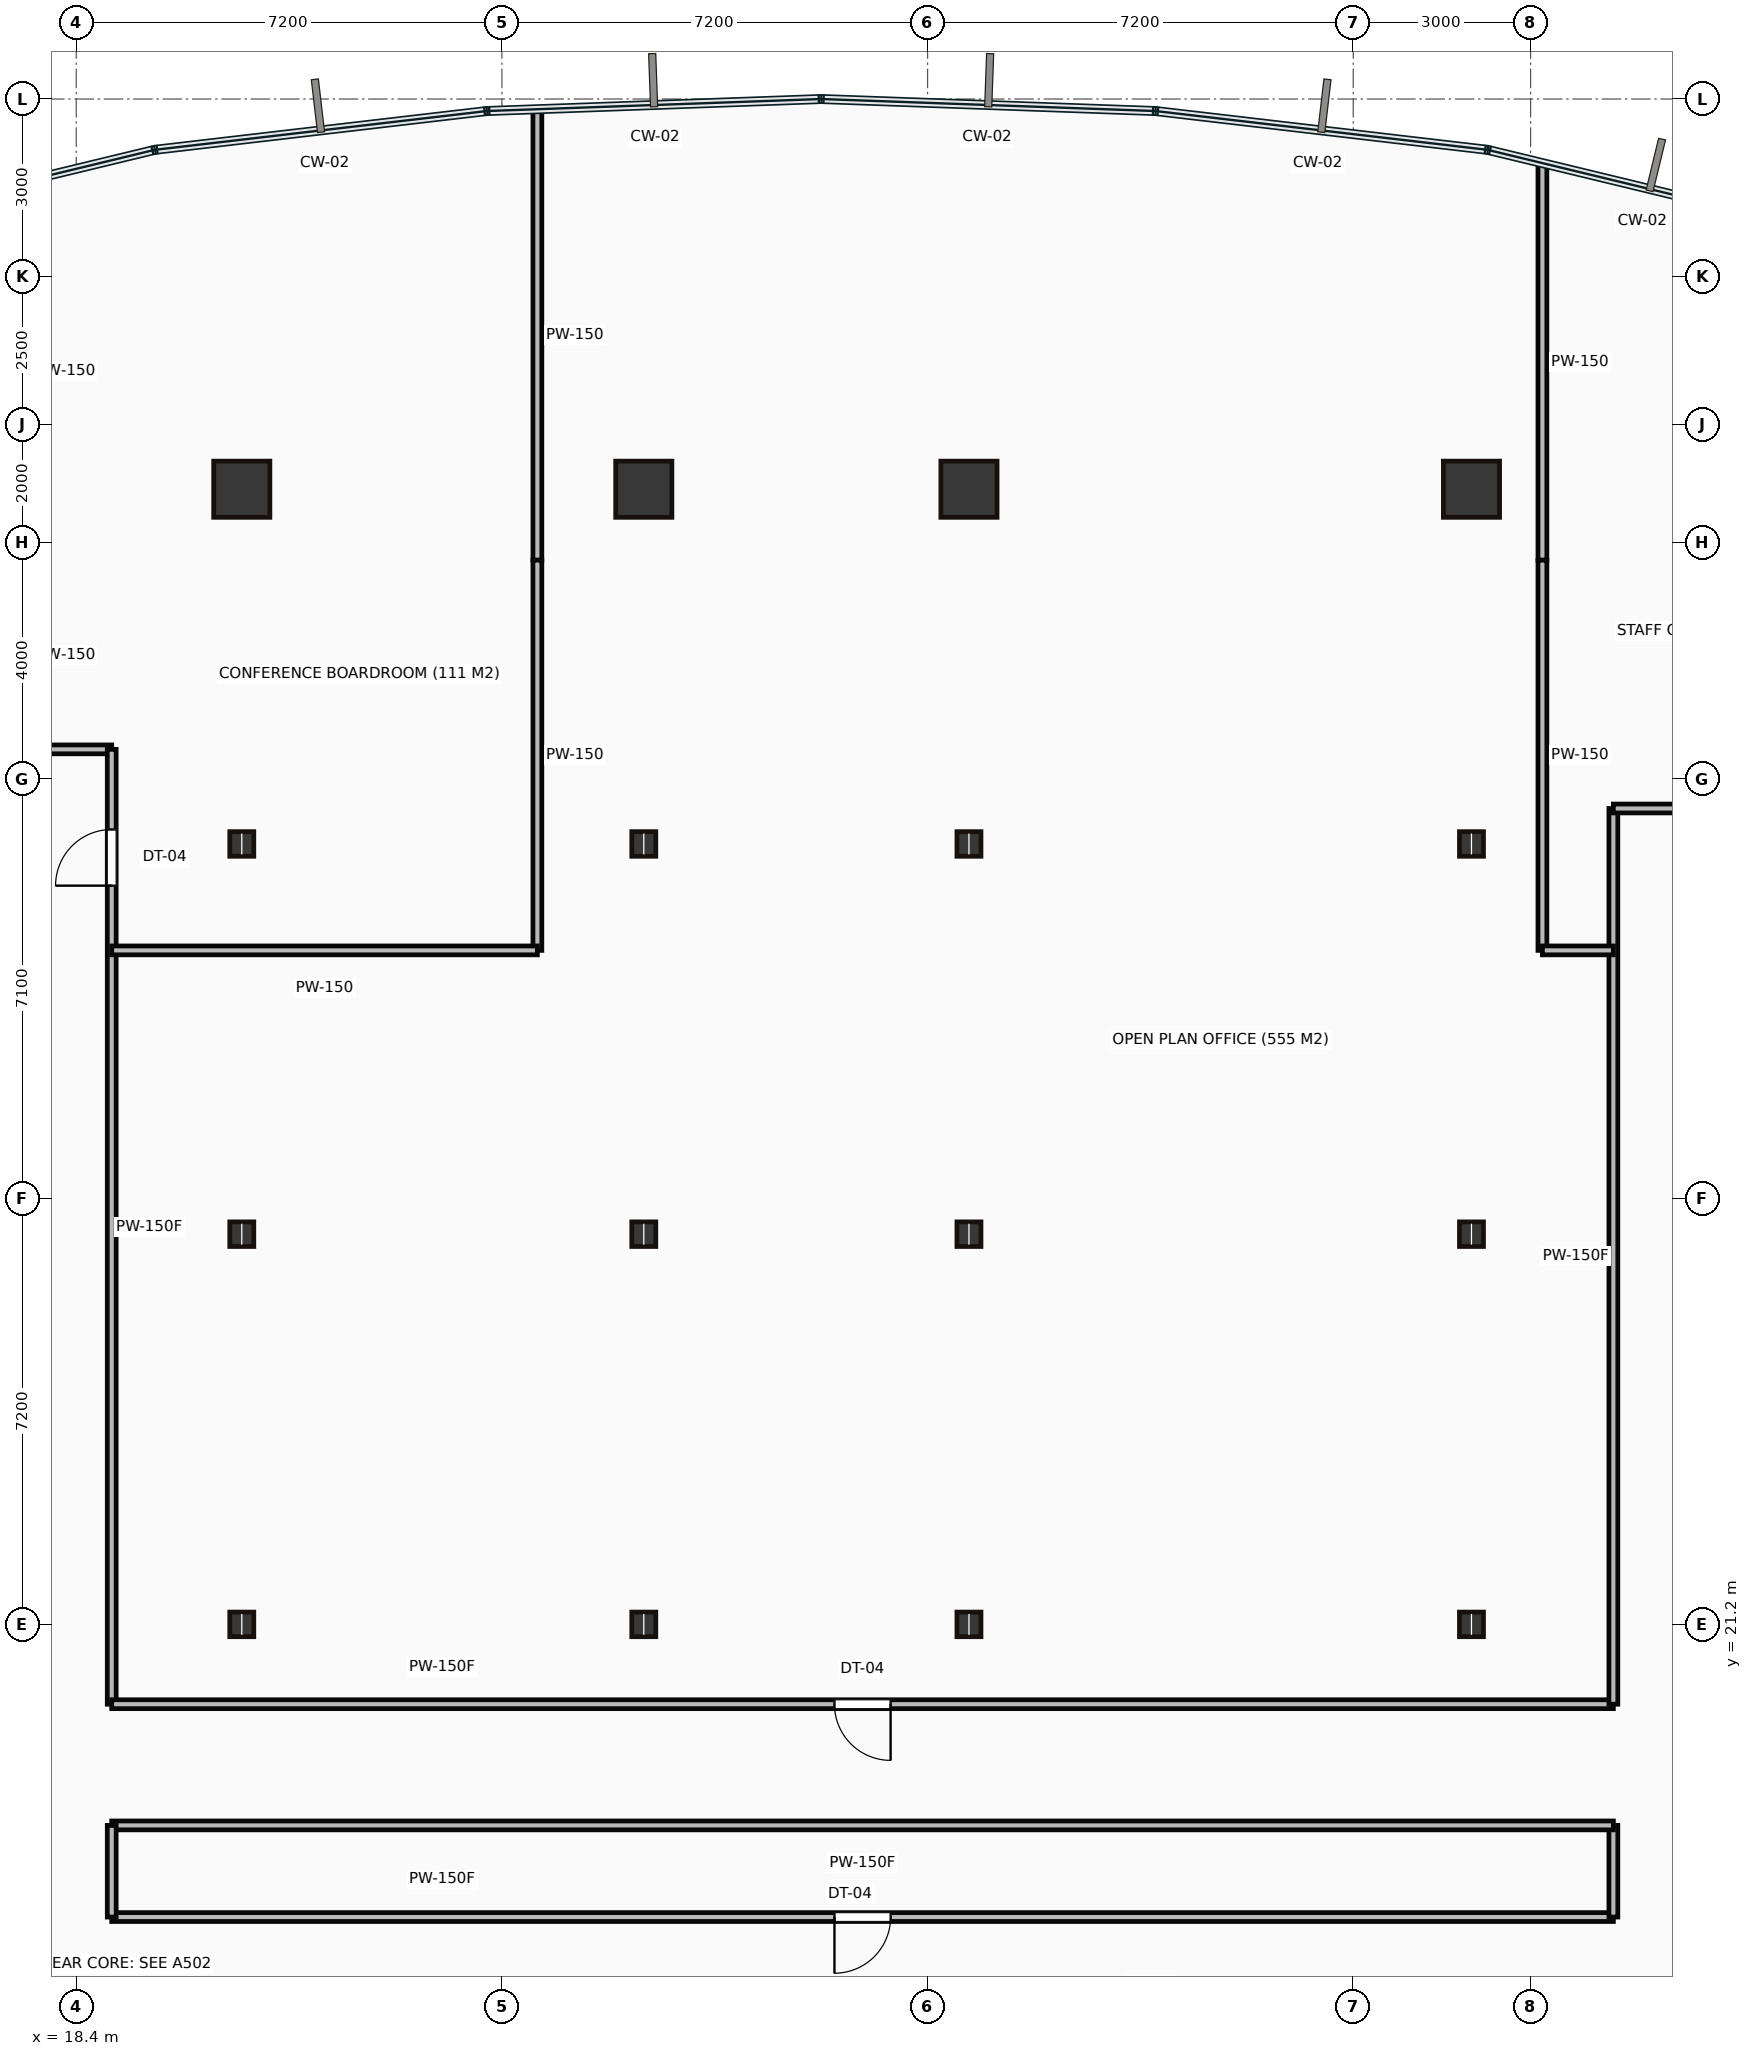
"""IFC4 building model, lengths in metres.
Left out: names, types, materials, properties, quantities, classifications, styles, units other than length and angle.
Written with IfcOpenShell. Run it as: python <this file> out.ifc"""

import sys

from ifc_helpers import new_model, si_unit, direction, frame, frame_2d, origin, origin_2d, place, context, subcontext, project, spatial, rectangle, hollow_rectangle, i_section, extrude, source, transform, mapped, element, fill, save


model = new_model("IFC4")
c1 = context("Model", 3, precision=1e-05, world=origin(), true_north=direction((0.0, 1.0)))
c2 = subcontext(c1, "Body", "Model", "MODEL_VIEW")
j1 = project(units=[si_unit("LENGTHUNIT", "METRE"), si_unit("PLANEANGLEUNIT", "RADIAN")], contexts=[c1])
p1 = place(None, origin())
s1 = spatial("IfcSite", under=j1, at=p1, CompositionType="ELEMENT")
p2 = place(p1, origin())
s2 = spatial("IfcBuilding", under=s1, at=p2, CompositionType="ELEMENT")
p3 = place(p2, frame((0.0, 0.0, 39.8)))
s3 = spatial("IfcBuildingStorey", under=s2, at=p3, CompositionType="ELEMENT", Elevation=39.8)
m1 = source(origin(), c2, "Body", "SweptSolid", [
    extrude(i_section(OverallWidth=0.406, OverallDepth=0.416, WebThickness=0.03, FlangeThickness=0.048, at=origin_2d()), origin(), (0.0, 0.0, 1.0), 3.65),
])
for number, where, z_axis, x_axis in (
    (1, (21.2, 21.2, 0.0), (0.0, 0.0, 1.0), (1.0, 0.0, 0.0)),
    (2, (21.2, 27.8, 0.0), (0.0, 0.0, 1.0), (1.0, 0.0, 0.0)),
    (3, (21.2, 34.4, 0.0), (0.0, 0.0, 1.0), (1.0, 0.0, 0.0)),
):
    element("IfcColumn", number, at=place(p3, frame(where, z_axis=z_axis, x_axis=x_axis)), inside=s3, PredefinedType="COLUMN", context=c2, shape_type="MappedRepresentation", body=[
        mapped(m1, transform((0.0, 0.0, 0.0))),
    ])
m2 = source(origin(), c2, "Body", "SweptSolid", [
    extrude(hollow_rectangle(XDim=0.95, YDim=0.95, WallThickness=0.045, at=origin_2d()), origin(), (0.0, 0.0, 1.0), 3.65),
])
p4 = place(p3, frame((21.2, 40.4, 0.0), z_axis=(0.0, 0.0, 1.0), x_axis=(1.0, 0.0, 0.0)))
e4 = element("IfcColumn", 4, at=p4, inside=s3, PredefinedType="COLUMN", context=c2, shape_type="MappedRepresentation", body=[
    mapped(m2, transform((0.0, 0.0, 0.0))),
])
for number, where, z_axis, x_axis in (
    (5, (28.0, 21.2, 0.0), (0.0, 0.0, 1.0), (1.0, 0.0, 0.0)),
    (6, (28.0, 27.8, 0.0), (0.0, 0.0, 1.0), (1.0, 0.0, 0.0)),
    (7, (28.0, 34.4, 0.0), (0.0, 0.0, 1.0), (1.0, 0.0, 0.0)),
):
    element("IfcColumn", number, at=place(p3, frame(where, z_axis=z_axis, x_axis=x_axis)), inside=s3, PredefinedType="COLUMN", context=c2, shape_type="MappedRepresentation", body=[
        mapped(m1, transform((0.0, 0.0, 0.0))),
    ])
p5 = place(p3, frame((28.0, 40.4, 0.0), z_axis=(0.0, 0.0, 1.0), x_axis=(1.0, 0.0, 0.0)))
e8 = element("IfcColumn", 8, at=p5, inside=s3, PredefinedType="COLUMN", context=c2, shape_type="MappedRepresentation", body=[
    mapped(m2, transform((0.0, 0.0, 0.0))),
])
for number, where, z_axis, x_axis in (
    (9, (33.5, 21.2, 0.0), (0.0, 0.0, 1.0), (1.0, 0.0, 0.0)),
    (10, (33.5, 27.8, 0.0), (0.0, 0.0, 1.0), (1.0, 0.0, 0.0)),
    (11, (33.5, 34.4, 0.0), (0.0, 0.0, 1.0), (1.0, 0.0, 0.0)),
):
    element("IfcColumn", number, at=place(p3, frame(where, z_axis=z_axis, x_axis=x_axis)), inside=s3, PredefinedType="COLUMN", context=c2, shape_type="MappedRepresentation", body=[
        mapped(m1, transform((0.0, 0.0, 0.0))),
    ])
p6 = place(p3, frame((33.5, 40.4, 0.0), z_axis=(0.0, 0.0, 1.0), x_axis=(1.0, 0.0, 0.0)))
e12 = element("IfcColumn", 12, at=p6, inside=s3, PredefinedType="COLUMN", context=c2, shape_type="MappedRepresentation", body=[
    mapped(m2, transform((0.0, 0.0, 0.0))),
])
for number, where, z_axis, x_axis in (
    (13, (42.0, 21.2, 0.0), (0.0, 0.0, 1.0), (1.0, 0.0, 0.0)),
    (14, (42.0, 27.8, 0.0), (0.0, 0.0, 1.0), (1.0, 0.0, 0.0)),
    (15, (42.0, 34.4, 0.0), (0.0, 0.0, 1.0), (1.0, 0.0, 0.0)),
):
    element("IfcColumn", number, at=place(p3, frame(where, z_axis=z_axis, x_axis=x_axis)), inside=s3, PredefinedType="COLUMN", context=c2, shape_type="MappedRepresentation", body=[
        mapped(m1, transform((0.0, 0.0, 0.0))),
    ])
p7 = place(p3, frame((42.0, 40.4, 0.0), z_axis=(0.0, 0.0, 1.0), x_axis=(1.0, 0.0, 0.0)))
e16 = element("IfcColumn", 16, at=p7, inside=s3, PredefinedType="COLUMN", context=c2, shape_type="MappedRepresentation", body=[
    mapped(m2, transform((0.0, 0.0, 0.0))),
])
m3 = source(origin(), c2, "Body", "SweptSolid", [
    extrude(rectangle(XDim=2.2, YDim=0.15, at=frame_2d((1.1, 0.0))), origin(), (0.0, 0.0, 1.0), 3.4),
])
p8 = place(p3, frame((16.8, 36.0, 0.0), z_axis=(0.0, 0.0, 1.0), x_axis=(1.0, 0.0, 0.0)))
e17 = element("IfcWall", 17, at=p8, inside=s3, PredefinedType="PARTITIONING", context=c2, shape_type="MappedRepresentation", body=[
    mapped(m3, transform((0.0, 0.0, 0.0))),
])
m4 = source(origin(), c2, "Body", "SweptSolid", [
    extrude(rectangle(XDim=16.15, YDim=0.15, at=frame_2d((8.075, 0.0))), origin(), (0.0, 0.0, 1.0), 3.4),
])
p9 = place(p3, frame((19.0, 36.0, 0.0), z_axis=(0.0, 0.0, 1.0), x_axis=(0.0, -1.0, 0.0)))
e18 = element("IfcWall", 18, at=p9, inside=s3, PredefinedType="PARTITIONING", context=c2, shape_type="MappedRepresentation", body=[
    mapped(m4, transform((0.0, 0.0, 0.0))),
])
p10 = place(p9, frame((1.355, 0.0, 0.0)))
e19 = element("IfcOpeningElement", 19, at=p10, cuts=e18, PredefinedType="OPENING", context=c2, shape_type="SweptSolid", body=[
    extrude(rectangle(XDim=0.95, YDim=2.15, at=frame_2d((0.475, 1.075))), frame((0.0, 0.085, 0.0), z_axis=(0.0, -1.0, 0.0), x_axis=(1.0, 0.0, 0.0)), (0.0, 0.0, 1.0), 0.17),
])
m5 = source(origin(), c2, "Body", "SweptSolid", [
    extrude(rectangle(XDim=25.4, YDim=0.15, at=frame_2d((12.7, 0.0))), origin(), (0.0, 0.0, 1.0), 3.4),
])
p11 = place(p3, frame((19.0, 19.85, 0.0), z_axis=(0.0, 0.0, 1.0), x_axis=(1.0, 0.0, 0.0)))
e20 = element("IfcWall", 20, at=p11, inside=s3, PredefinedType="PARTITIONING", context=c2, shape_type="MappedRepresentation", body=[
    mapped(m5, transform((0.0, 0.0, 0.0))),
])
p12 = place(p11, frame((12.225, 0.0, 0.0)))
e21 = element("IfcOpeningElement", 21, at=p12, cuts=e20, PredefinedType="OPENING", context=c2, shape_type="SweptSolid", body=[
    extrude(rectangle(XDim=0.95, YDim=2.15, at=frame_2d((0.475, 1.075))), frame((0.0, 0.085, 0.0), z_axis=(0.0, -1.0, 0.0), x_axis=(1.0, 0.0, 0.0)), (0.0, 0.0, 1.0), 0.17),
])
m6 = source(origin(), c2, "Body", "SweptSolid", [
    extrude(rectangle(XDim=15.15, YDim=0.15, at=frame_2d((7.575, 0.0))), origin(), (0.0, 0.0, 1.0), 3.4),
])
p13 = place(p3, frame((44.4, 19.85, 0.0), z_axis=(0.0, 0.0, 1.0), x_axis=(0.0, 1.0, 0.0)))
e22 = element("IfcWall", 22, at=p13, inside=s3, PredefinedType="PARTITIONING", context=c2, shape_type="MappedRepresentation", body=[
    mapped(m6, transform((0.0, 0.0, 0.0))),
])
m7 = source(origin(), c2, "Body", "SweptSolid", [
    extrude(rectangle(XDim=2.2, YDim=0.15, at=frame_2d((1.1, 0.0))), origin(), (0.0, 0.0, 1.0), 3.4),
])
p14 = place(p3, frame((44.4, 35.0, 0.0), z_axis=(0.0, 0.0, 1.0), x_axis=(1.0, 0.0, 0.0)))
e23 = element("IfcWall", 23, at=p14, inside=s3, PredefinedType="PARTITIONING", context=c2, shape_type="MappedRepresentation", body=[
    mapped(m7, transform((0.0, 0.0, 0.0))),
])
p15 = place(p3, frame((19.0, 16.25, 0.0), z_axis=(0.0, 0.0, 1.0), x_axis=(1.0, 0.0, 0.0)))
e24 = element("IfcWall", 24, at=p15, inside=s3, PredefinedType="PARTITIONING", context=c2, shape_type="MappedRepresentation", body=[
    mapped(m5, transform((0.0, 0.0, 0.0))),
])
p16 = place(p15, frame((12.225, 0.0, 0.0)))
e25 = element("IfcOpeningElement", 25, at=p16, cuts=e24, PredefinedType="OPENING", context=c2, shape_type="SweptSolid", body=[
    extrude(rectangle(XDim=0.95, YDim=2.15, at=frame_2d((0.475, 1.075))), frame((0.0, 0.085, 0.0), z_axis=(0.0, -1.0, 0.0), x_axis=(1.0, 0.0, 0.0)), (0.0, 0.0, 1.0), 0.17),
])
m8 = source(origin(), c2, "Body", "SweptSolid", [
    extrude(rectangle(XDim=1.55, YDim=0.15, at=frame_2d((0.775, 0.0))), origin(), (0.0, 0.0, 1.0), 3.4),
])
p17 = place(p3, frame((44.4, 16.25, 0.0), z_axis=(0.0, 0.0, 1.0), x_axis=(0.0, 1.0, 0.0)))
e26 = element("IfcWall", 26, at=p17, inside=s3, PredefinedType="PARTITIONING", context=c2, shape_type="MappedRepresentation", body=[
    mapped(m8, transform((0.0, 0.0, 0.0))),
])
p18 = place(p3, frame((44.4, 17.8, 0.0), z_axis=(0.0, 0.0, 1.0), x_axis=(-1.0, 0.0, 0.0)))
e27 = element("IfcWall", 27, at=p18, inside=s3, PredefinedType="PARTITIONING", context=c2, shape_type="MappedRepresentation", body=[
    mapped(m5, transform((0.0, 0.0, 0.0))),
])
p19 = place(p3, frame((19.0, 17.8, 0.0), z_axis=(0.0, 0.0, 1.0), x_axis=(0.0, -1.0, 0.0)))
e28 = element("IfcWall", 28, at=p19, inside=s3, PredefinedType="PARTITIONING", context=c2, shape_type="MappedRepresentation", body=[
    mapped(m8, transform((0.0, 0.0, 0.0))),
])
m9 = source(origin(), c2, "Body", "SweptSolid", [
    extrude(rectangle(XDim=7.608, YDim=0.15, at=frame_2d((3.804, 0.0))), origin(), (0.0, 0.0, 1.0), 3.4),
])
p20 = place(p3, frame((26.2, 46.808, 0.0), z_axis=(0.0, 0.0, 1.0), x_axis=(0.0, -1.0, 0.0)))
e29 = element("IfcWall", 29, at=p20, inside=s3, PredefinedType="PARTITIONING", context=c2, shape_type="MappedRepresentation", body=[
    mapped(m9, transform((0.0, 0.0, 0.0))),
])
m10 = source(origin(), c2, "Body", "SweptSolid", [
    extrude(rectangle(XDim=6.6, YDim=0.15, at=frame_2d((3.3, 0.0))), origin(), (0.0, 0.0, 1.0), 3.4),
])
p21 = place(p3, frame((26.2, 39.2, 0.0), z_axis=(0.0, 0.0, 1.0), x_axis=(0.0, -1.0, 0.0)))
e30 = element("IfcWall", 30, at=p21, inside=s3, PredefinedType="PARTITIONING", context=c2, shape_type="MappedRepresentation", body=[
    mapped(m10, transform((0.0, 0.0, 0.0))),
])
m11 = source(origin(), c2, "Body", "SweptSolid", [
    extrude(rectangle(XDim=7.2, YDim=0.15, at=frame_2d((3.6, 0.0))), origin(), (0.0, 0.0, 1.0), 3.4),
])
p22 = place(p3, frame((26.2, 32.6, 0.0), z_axis=(0.0, 0.0, 1.0), x_axis=(-1.0, 0.0, 0.0)))
e31 = element("IfcWall", 31, at=p22, inside=s3, PredefinedType="PARTITIONING", context=c2, shape_type="MappedRepresentation", body=[
    mapped(m11, transform((0.0, 0.0, 0.0))),
])
m12 = source(origin(), c2, "Body", "SweptSolid", [
    extrude(rectangle(XDim=6.696, YDim=0.15, at=frame_2d((3.348, 0.0))), origin(), (0.0, 0.0, 1.0), 3.4),
])
p23 = place(p3, frame((43.2, 45.896, 0.0), z_axis=(0.0, 0.0, 1.0), x_axis=(0.0, -1.0, 0.0)))
e32 = element("IfcWall", 32, at=p23, inside=s3, PredefinedType="PARTITIONING", context=c2, shape_type="MappedRepresentation", body=[
    mapped(m12, transform((0.0, 0.0, 0.0))),
])
p24 = place(p3, frame((43.2, 39.2, 0.0), z_axis=(0.0, 0.0, 1.0), x_axis=(0.0, -1.0, 0.0)))
e33 = element("IfcWall", 33, at=p24, inside=s3, PredefinedType="PARTITIONING", context=c2, shape_type="MappedRepresentation", body=[
    mapped(m10, transform((0.0, 0.0, 0.0))),
])
m13 = source(origin(), c2, "Body", "SweptSolid", [
    extrude(rectangle(XDim=1.2, YDim=0.15, at=frame_2d((0.6, 0.0))), origin(), (0.0, 0.0, 1.0), 3.4),
])
p25 = place(p3, frame((43.2, 32.6, 0.0), z_axis=(0.0, 0.0, 1.0), x_axis=(1.0, 0.0, 0.0)))
e34 = element("IfcWall", 34, at=p25, inside=s3, PredefinedType="PARTITIONING", context=c2, shape_type="MappedRepresentation", body=[
    mapped(m13, transform((0.0, 0.0, 0.0))),
])
m14 = source(origin(), c2, "Body", "SweptSolid", [
    extrude(rectangle(XDim=0.95, YDim=2.15, at=frame_2d((0.475, 1.075))), frame((0.0, 0.025, 0.0), z_axis=(0.0, -1.0, 0.0), x_axis=(1.0, 0.0, 0.0)), (0.0, 0.0, 1.0), 0.05),
])
p26 = place(p10, origin())
e35 = element("IfcDoor", 35, at=p26, inside=s3, OperationType="SINGLE_SWING_RIGHT", PredefinedType="DOOR", context=c2, shape_type="MappedRepresentation", body=[
    mapped(m14, transform((0.0, 0.0, 0.0))),
])
fill(e19, e35)
p27 = place(p16, origin())
e36 = element("IfcDoor", 36, at=p27, inside=s3, OperationType="SINGLE_SWING_LEFT", PredefinedType="DOOR", context=c2, shape_type="MappedRepresentation", body=[
    mapped(m14, transform((0.0, 0.0, 0.0))),
])
fill(e25, e36)
p28 = place(p12, origin())
e37 = element("IfcDoor", 37, at=p28, inside=s3, OperationType="SINGLE_SWING_RIGHT", PredefinedType="DOOR", context=c2, shape_type="MappedRepresentation", body=[
    mapped(m14, transform((0.0, 0.0, 0.0))),
])
fill(e21, e37)
save(model, sys.argv[1])
